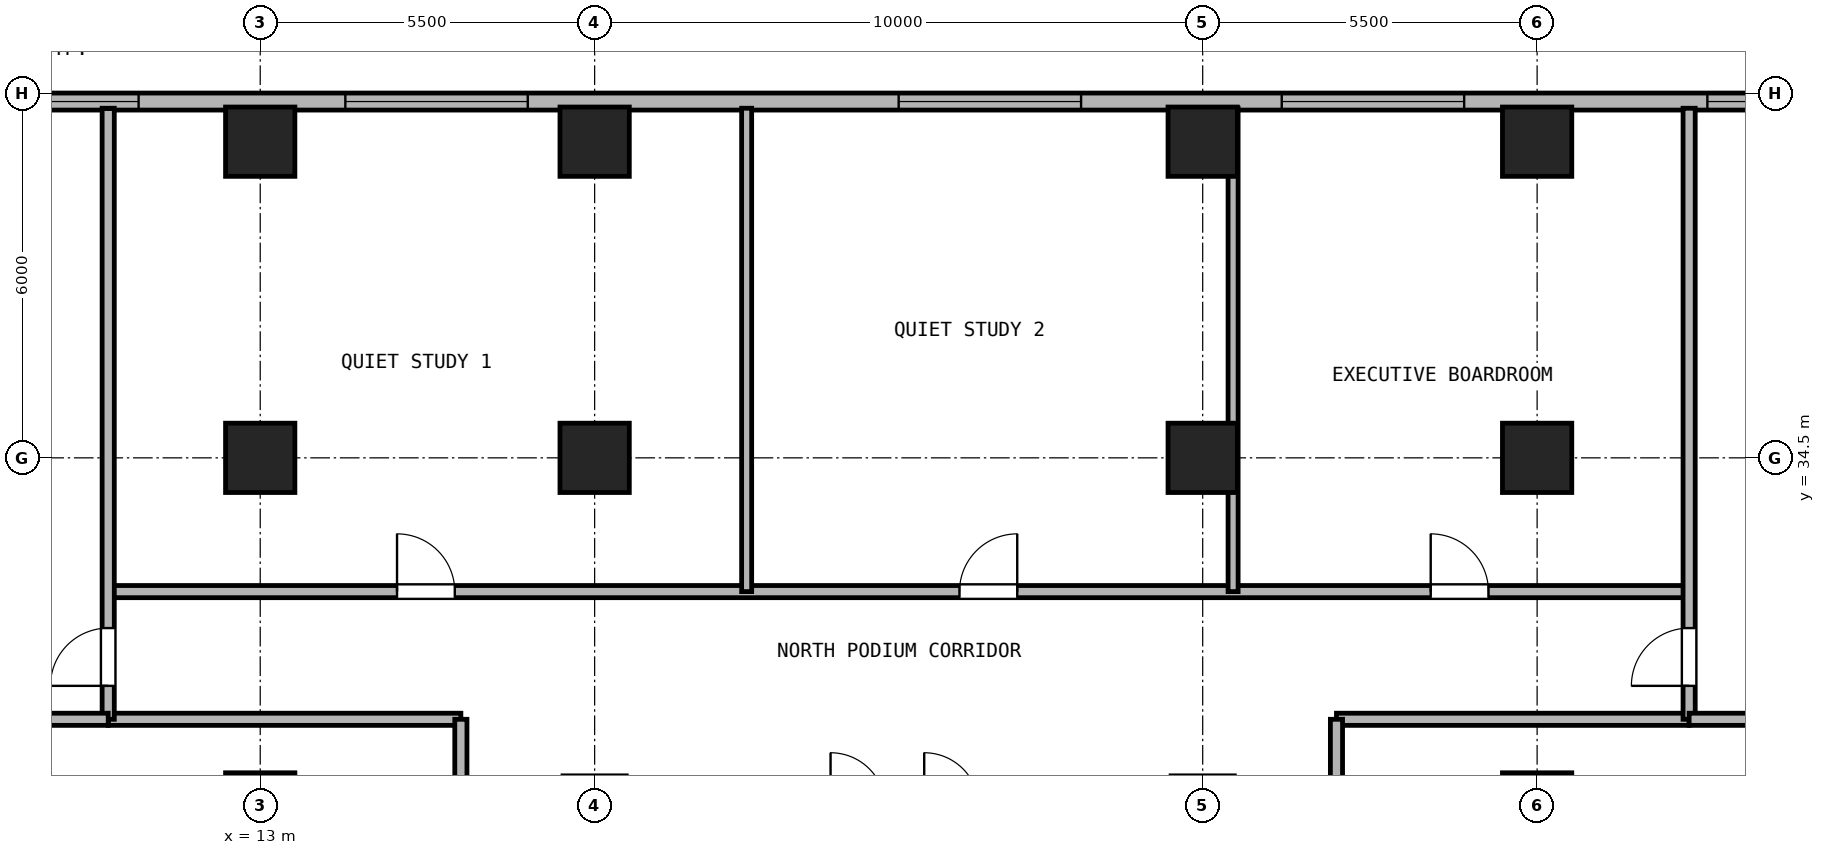
"""IFC4 building model, lengths in metres.
Left out: names, types, materials, properties, quantities, classifications, styles, units other than length and angle.
Written with IfcOpenShell. Run it as: python <this file> out.ifc"""

import sys

from ifc_helpers import new_model, si_unit, direction, frame, frame_2d, origin, origin_2d, place, context, subcontext, project, spatial, rectangle, hollow_rectangle, extrude, source, transform, mapped, element, fill, save


model = new_model("IFC4")
c1 = context("Model", 3, precision=1e-05, world=origin(), true_north=direction((0.0, 1.0)))
c2 = subcontext(c1, "Body", "Model", "MODEL_VIEW")
j1 = project(units=[si_unit("LENGTHUNIT", "METRE"), si_unit("PLANEANGLEUNIT", "RADIAN")], contexts=[c1])
p1 = place(None, origin())
s1 = spatial("IfcSite", under=j1, at=p1, CompositionType="ELEMENT")
p2 = place(p1, origin())
s2 = spatial("IfcBuilding", under=s1, at=p2, CompositionType="ELEMENT")
p3 = place(p2, frame((0.0, 0.0, 13.5)))
s3 = spatial("IfcBuildingStorey", under=s2, at=p3, CompositionType="ELEMENT", Elevation=13.5)
m1 = source(origin(), c2, "Body", "SweptSolid", [
    extrude(hollow_rectangle(XDim=1.14, YDim=1.14, WallThickness=0.07, at=origin_2d()), origin(), (0.0, 0.0, 1.0), 4.18),
])
for number, where, z_axis, x_axis in (
    (1, (13.0, 39.7, 0.0), (0.0, 0.0, 1.0), (1.0, 0.0, 0.0)),
    (2, (18.5, 39.7, 0.0), (0.0, 0.0, 1.0), (1.0, 0.0, 0.0)),
    (3, (28.5, 39.7, 0.0), (0.0, 0.0, 1.0), (1.0, 0.0, 0.0)),
    (4, (34.0, 39.7, 0.0), (0.0, 0.0, 1.0), (1.0, 0.0, 0.0)),
    (5, (13.0, 28.75, 0.0), (0.0, 0.0, 1.0), (1.0, 0.0, 0.0)),
    (6, (13.0, 34.5, 0.0), (0.0, 0.0, 1.0), (1.0, 0.0, 0.0)),
    (7, (18.5, 34.5, 0.0), (0.0, 0.0, 1.0), (1.0, 0.0, 0.0)),
    (8, (28.5, 34.5, 0.0), (0.0, 0.0, 1.0), (1.0, 0.0, 0.0)),
    (9, (34.0, 28.75, 0.0), (0.0, 0.0, 1.0), (1.0, 0.0, 0.0)),
    (10, (34.0, 34.5, 0.0), (0.0, 0.0, 1.0), (1.0, 0.0, 0.0)),
):
    element("IfcColumn", number, at=place(p3, frame(where, z_axis=z_axis, x_axis=x_axis)), inside=s3, PredefinedType="COLUMN", context=c2, shape_type="MappedRepresentation", body=[
        mapped(m1, transform((0.0, 0.0, 0.0), x_axis=(1.0, 0.0, 0.0), y_axis=(0.0, 1.0, 0.0), z_axis=(0.0, 0.0, 1.0), scale=1.0)),
    ])
p4 = place(p3, frame((4.0, 40.36, 0.0), z_axis=(0.0, 0.0, 1.0), x_axis=(1.0, 0.0, 0.0)))
e11 = element("IfcWall", 11, at=p4, inside=s3, PredefinedType="SOLIDWALL", context=c2, shape_type="SweptSolid", body=[
    extrude(rectangle(XDim=39.0, YDim=0.28, at=frame_2d((19.5, 0.0))), origin(), (0.0, 0.0, 1.0), 4.18),
])
p5 = place(p4, frame((4.0, 0.0, 0.9)))
e12 = element("IfcOpeningElement", 12, at=p5, cuts=e11, PredefinedType="OPENING", context=c2, shape_type="SweptSolid", body=[
    extrude(rectangle(XDim=3.0, YDim=2.25, at=frame_2d((1.5, 1.125))), frame((0.0, 0.15, 0.0), z_axis=(0.0, -1.0, 0.0), x_axis=(1.0, 0.0, 0.0)), (0.0, 0.0, 1.0), 0.3),
])
p6 = place(p4, frame((10.4, 0.0, 0.9)))
e13 = element("IfcOpeningElement", 13, at=p6, cuts=e11, PredefinedType="OPENING", context=c2, shape_type="SweptSolid", body=[
    extrude(rectangle(XDim=3.0, YDim=2.25, at=frame_2d((1.5, 1.125))), frame((0.0, 0.15, 0.0), z_axis=(0.0, -1.0, 0.0), x_axis=(1.0, 0.0, 0.0)), (0.0, 0.0, 1.0), 0.3),
])
p7 = place(p4, frame((19.5, 0.0, 0.9)))
e14 = element("IfcOpeningElement", 14, at=p7, cuts=e11, PredefinedType="OPENING", context=c2, shape_type="SweptSolid", body=[
    extrude(rectangle(XDim=3.0, YDim=2.25, at=frame_2d((1.5, 1.125))), frame((0.0, 0.15, 0.0), z_axis=(0.0, -1.0, 0.0), x_axis=(1.0, 0.0, 0.0)), (0.0, 0.0, 1.0), 0.3),
])
p8 = place(p4, frame((25.8, 0.0, 0.9)))
e15 = element("IfcOpeningElement", 15, at=p8, cuts=e11, PredefinedType="OPENING", context=c2, shape_type="SweptSolid", body=[
    extrude(rectangle(XDim=3.0, YDim=2.25, at=frame_2d((1.5, 1.125))), frame((0.0, 0.15, 0.0), z_axis=(0.0, -1.0, 0.0), x_axis=(1.0, 0.0, 0.0)), (0.0, 0.0, 1.0), 0.3),
])
p9 = place(p4, frame((32.8, 0.0, 0.9)))
e16 = element("IfcOpeningElement", 16, at=p9, cuts=e11, PredefinedType="OPENING", context=c2, shape_type="SweptSolid", body=[
    extrude(rectangle(XDim=3.0, YDim=2.25, at=frame_2d((1.5, 1.125))), frame((0.0, 0.15, 0.0), z_axis=(0.0, -1.0, 0.0), x_axis=(1.0, 0.0, 0.0)), (0.0, 0.0, 1.0), 0.3),
])
p10 = place(p3, frame((10.5, 32.3, 0.0), z_axis=(0.0, 0.0, 1.0), x_axis=(1.0, 0.0, 0.0)))
e17 = element("IfcWall", 17, at=p10, inside=s3, PredefinedType="PARTITIONING", context=c2, shape_type="SweptSolid", body=[
    extrude(rectangle(XDim=26.0, YDim=0.2, at=frame_2d((13.0, 0.0))), origin(), (0.0, 0.0, 1.0), 4.18),
])
p11 = place(p10, frame((4.75, 0.0, 0.0)))
e18 = element("IfcOpeningElement", 18, at=p11, cuts=e17, PredefinedType="OPENING", context=c2, shape_type="SweptSolid", body=[
    extrude(rectangle(XDim=0.95, YDim=2.15, at=frame_2d((0.475, 1.075))), frame((0.0, 0.11, 0.0), z_axis=(0.0, -1.0, 0.0), x_axis=(1.0, 0.0, 0.0)), (0.0, 0.0, 1.0), 0.22),
])
p12 = place(p10, frame((14.0, 0.0, 0.0)))
e19 = element("IfcOpeningElement", 19, at=p12, cuts=e17, PredefinedType="OPENING", context=c2, shape_type="SweptSolid", body=[
    extrude(rectangle(XDim=0.95, YDim=2.15, at=frame_2d((0.475, 1.075))), frame((0.0, 0.11, 0.0), z_axis=(0.0, -1.0, 0.0), x_axis=(1.0, 0.0, 0.0)), (0.0, 0.0, 1.0), 0.22),
])
p13 = place(p10, frame((21.75, 0.0, 0.0)))
e20 = element("IfcOpeningElement", 20, at=p13, cuts=e17, PredefinedType="OPENING", context=c2, shape_type="SweptSolid", body=[
    extrude(rectangle(XDim=0.95, YDim=2.15, at=frame_2d((0.475, 1.075))), frame((0.0, 0.11, 0.0), z_axis=(0.0, -1.0, 0.0), x_axis=(1.0, 0.0, 0.0)), (0.0, 0.0, 1.0), 0.22),
])
for number, where, z_axis, x_axis in (
    (21, (10.5, 30.2, 0.0), (0.0, 0.0, 1.0), (1.0, 0.0, 0.0)),
    (22, (30.7, 30.2, 0.0), (0.0, 0.0, 1.0), (1.0, 0.0, 0.0)),
):
    element("IfcWall", number, at=place(p3, frame(where, z_axis=z_axis, x_axis=x_axis)), inside=s3, PredefinedType="PARTITIONING", context=c2, shape_type="SweptSolid", body=[
        extrude(rectangle(XDim=5.8, YDim=0.2, at=frame_2d((2.9, 0.0))), origin(), (0.0, 0.0, 1.0), 4.18),
    ])
p14 = place(p3, frame((16.3, 9.5, 0.0), z_axis=(0.0, 0.0, 1.0), x_axis=(0.0, 1.0, 0.0)))
e23 = element("IfcWall", 23, at=p14, inside=s3, PredefinedType="PARTITIONING", context=c2, shape_type="SweptSolid", body=[
    extrude(rectangle(XDim=20.7, YDim=0.2, at=frame_2d((10.35, 0.0))), origin(), (0.0, 0.0, 1.0), 4.18),
])
p15 = place(p14, frame((5.0, 0.0, 0.0)))
e24 = element("IfcOpeningElement", 24, at=p15, cuts=e23, PredefinedType="OPENING", context=c2, shape_type="SweptSolid", body=[
    extrude(rectangle(XDim=0.95, YDim=2.15, at=frame_2d((0.475, 1.075))), frame((0.0, 0.11, 0.0), z_axis=(0.0, -1.0, 0.0), x_axis=(1.0, 0.0, 0.0)), (0.0, 0.0, 1.0), 0.22),
])
p16 = place(p14, frame((15.35, 0.0, 0.0)))
e25 = element("IfcOpeningElement", 25, at=p16, cuts=e23, PredefinedType="OPENING", context=c2, shape_type="SweptSolid", body=[
    extrude(rectangle(XDim=0.95, YDim=2.15, at=frame_2d((0.475, 1.075))), frame((0.0, 0.11, 0.0), z_axis=(0.0, -1.0, 0.0), x_axis=(1.0, 0.0, 0.0)), (0.0, 0.0, 1.0), 0.22),
])
p17 = place(p3, frame((30.7, 9.5, 0.0), z_axis=(0.0, 0.0, 1.0), x_axis=(0.0, 1.0, 0.0)))
e26 = element("IfcWall", 26, at=p17, inside=s3, PredefinedType="PARTITIONING", context=c2, shape_type="SweptSolid", body=[
    extrude(rectangle(XDim=20.7, YDim=0.2, at=frame_2d((10.35, 0.0))), origin(), (0.0, 0.0, 1.0), 4.18),
])
p18 = place(p17, frame((9.85, 0.0, 0.0)))
e27 = element("IfcOpeningElement", 27, at=p18, cuts=e26, PredefinedType="OPENING", context=c2, shape_type="SweptSolid", body=[
    extrude(rectangle(XDim=0.95, YDim=2.15, at=frame_2d((0.475, 1.075))), frame((0.0, 0.11, 0.0), z_axis=(0.0, -1.0, 0.0), x_axis=(1.0, 0.0, 0.0)), (0.0, 0.0, 1.0), 0.22),
])
p19 = place(p3, frame((10.5, 30.2, 0.0), z_axis=(0.0, 0.0, 1.0), x_axis=(0.0, 1.0, 0.0)))
e28 = element("IfcWall", 28, at=p19, inside=s3, PredefinedType="PARTITIONING", context=c2, shape_type="SweptSolid", body=[
    extrude(rectangle(XDim=10.05, YDim=0.2, at=frame_2d((5.025, 0.0))), origin(), (0.0, 0.0, 1.0), 4.18),
])
p20 = place(p19, frame((0.55, 0.0, 0.0)))
e29 = element("IfcOpeningElement", 29, at=p20, cuts=e28, PredefinedType="OPENING", context=c2, shape_type="SweptSolid", body=[
    extrude(rectangle(XDim=0.95, YDim=2.15, at=frame_2d((0.475, 1.075))), frame((0.0, 0.11, 0.0), z_axis=(0.0, -1.0, 0.0), x_axis=(1.0, 0.0, 0.0)), (0.0, 0.0, 1.0), 0.22),
])
p21 = place(p3, frame((36.5, 30.2, 0.0), z_axis=(0.0, 0.0, 1.0), x_axis=(0.0, 1.0, 0.0)))
e30 = element("IfcWall", 30, at=p21, inside=s3, PredefinedType="PARTITIONING", context=c2, shape_type="SweptSolid", body=[
    extrude(rectangle(XDim=10.05, YDim=0.2, at=frame_2d((5.025, 0.0))), origin(), (0.0, 0.0, 1.0), 4.18),
])
p22 = place(p21, frame((0.55, 0.0, 0.0)))
e31 = element("IfcOpeningElement", 31, at=p22, cuts=e30, PredefinedType="OPENING", context=c2, shape_type="SweptSolid", body=[
    extrude(rectangle(XDim=0.95, YDim=2.15, at=frame_2d((0.475, 1.075))), frame((0.0, 0.11, 0.0), z_axis=(0.0, -1.0, 0.0), x_axis=(1.0, 0.0, 0.0)), (0.0, 0.0, 1.0), 0.22),
])
for number, where, z_axis, x_axis in (
    (32, (0.25, 30.2, 0.0), (0.0, 0.0, 1.0), (1.0, 0.0, 0.0)),
    (33, (36.5, 30.2, 0.0), (0.0, 0.0, 1.0), (1.0, 0.0, 0.0)),
):
    element("IfcWall", number, at=place(p3, frame(where, z_axis=z_axis, x_axis=x_axis)), inside=s3, PredefinedType="PARTITIONING", context=c2, shape_type="SweptSolid", body=[
        extrude(rectangle(XDim=10.25, YDim=0.2, at=frame_2d((5.125, 0.0))), origin(), (0.0, 0.0, 1.0), 4.18),
    ])
for number, where, z_axis, x_axis in (
    (34, (21.0, 32.3, 0.0), (0.0, 0.0, 1.0), (0.0, 1.0, 0.0)),
    (35, (29.0, 32.3, 0.0), (0.0, 0.0, 1.0), (0.0, 1.0, 0.0)),
):
    element("IfcWall", number, at=place(p3, frame(where, z_axis=z_axis, x_axis=x_axis)), inside=s3, PredefinedType="PARTITIONING", context=c2, shape_type="SweptSolid", body=[
        extrude(rectangle(XDim=7.95, YDim=0.165, at=frame_2d((3.975, 0.0))), origin(), (0.0, 0.0, 1.0), 4.18),
    ])
p23 = place(p5, origin())
e36 = element("IfcWindow", 36, at=p23, inside=s3, PartitioningType="SINGLE_PANEL", PredefinedType="WINDOW", context=c2, shape_type="SweptSolid", body=[
    extrude(rectangle(XDim=3.0, YDim=2.25, at=frame_2d((1.5, 1.125))), frame((0.0, 0.03, 0.0), z_axis=(0.0, -1.0, 0.0), x_axis=(1.0, 0.0, 0.0)), (0.0, 0.0, 1.0), 0.06),
])
fill(e12, e36)
p24 = place(p6, origin())
e37 = element("IfcWindow", 37, at=p24, inside=s3, PartitioningType="SINGLE_PANEL", PredefinedType="WINDOW", context=c2, shape_type="SweptSolid", body=[
    extrude(rectangle(XDim=3.0, YDim=2.25, at=frame_2d((1.5, 1.125))), frame((0.0, 0.03, 0.0), z_axis=(0.0, -1.0, 0.0), x_axis=(1.0, 0.0, 0.0)), (0.0, 0.0, 1.0), 0.06),
])
fill(e13, e37)
p25 = place(p7, origin())
e38 = element("IfcWindow", 38, at=p25, inside=s3, PartitioningType="SINGLE_PANEL", PredefinedType="WINDOW", context=c2, shape_type="SweptSolid", body=[
    extrude(rectangle(XDim=3.0, YDim=2.25, at=frame_2d((1.5, 1.125))), frame((0.0, 0.03, 0.0), z_axis=(0.0, -1.0, 0.0), x_axis=(1.0, 0.0, 0.0)), (0.0, 0.0, 1.0), 0.06),
])
fill(e14, e38)
p26 = place(p8, origin())
e39 = element("IfcWindow", 39, at=p26, inside=s3, PartitioningType="SINGLE_PANEL", PredefinedType="WINDOW", context=c2, shape_type="SweptSolid", body=[
    extrude(rectangle(XDim=3.0, YDim=2.25, at=frame_2d((1.5, 1.125))), frame((0.0, 0.03, 0.0), z_axis=(0.0, -1.0, 0.0), x_axis=(1.0, 0.0, 0.0)), (0.0, 0.0, 1.0), 0.06),
])
fill(e15, e39)
p27 = place(p9, origin())
e40 = element("IfcWindow", 40, at=p27, inside=s3, PartitioningType="SINGLE_PANEL", PredefinedType="WINDOW", context=c2, shape_type="SweptSolid", body=[
    extrude(rectangle(XDim=3.0, YDim=2.25, at=frame_2d((1.5, 1.125))), frame((0.0, 0.03, 0.0), z_axis=(0.0, -1.0, 0.0), x_axis=(1.0, 0.0, 0.0)), (0.0, 0.0, 1.0), 0.06),
])
fill(e16, e40)
p28 = place(p11, origin())
e41 = element("IfcDoor", 41, at=p28, inside=s3, OperationType="SINGLE_SWING_LEFT", PredefinedType="DOOR", context=c2, shape_type="SweptSolid", body=[
    extrude(rectangle(XDim=0.95, YDim=2.15, at=frame_2d((0.475, 1.075))), frame((0.0, 0.025, 0.0), z_axis=(0.0, -1.0, 0.0), x_axis=(1.0, 0.0, 0.0)), (0.0, 0.0, 1.0), 0.05),
])
fill(e18, e41)
p29 = place(p12, origin())
e42 = element("IfcDoor", 42, at=p29, inside=s3, OperationType="SINGLE_SWING_RIGHT", PredefinedType="DOOR", context=c2, shape_type="SweptSolid", body=[
    extrude(rectangle(XDim=0.95, YDim=2.15, at=frame_2d((0.475, 1.075))), frame((0.0, 0.025, 0.0), z_axis=(0.0, -1.0, 0.0), x_axis=(1.0, 0.0, 0.0)), (0.0, 0.0, 1.0), 0.05),
])
fill(e19, e42)
p30 = place(p13, origin())
e43 = element("IfcDoor", 43, at=p30, inside=s3, OperationType="SINGLE_SWING_LEFT", PredefinedType="DOOR", context=c2, shape_type="SweptSolid", body=[
    extrude(rectangle(XDim=0.95, YDim=2.15, at=frame_2d((0.475, 1.075))), frame((0.0, 0.025, 0.0), z_axis=(0.0, -1.0, 0.0), x_axis=(1.0, 0.0, 0.0)), (0.0, 0.0, 1.0), 0.05),
])
fill(e20, e43)
p31 = place(p20, frame((0.95, 0.0, 0.0), z_axis=(0.0, 0.0, 1.0), x_axis=(-1.0, 0.0, 0.0)))
e44 = element("IfcDoor", 44, at=p31, inside=s3, OperationType="SINGLE_SWING_LEFT", PredefinedType="DOOR", context=c2, shape_type="SweptSolid", body=[
    extrude(rectangle(XDim=0.95, YDim=2.15, at=frame_2d((0.475, 1.075))), frame((0.0, 0.025, 0.0), z_axis=(0.0, -1.0, 0.0), x_axis=(1.0, 0.0, 0.0)), (0.0, 0.0, 1.0), 0.05),
])
fill(e29, e44)
p32 = place(p22, origin())
e45 = element("IfcDoor", 45, at=p32, inside=s3, OperationType="SINGLE_SWING_LEFT", PredefinedType="DOOR", context=c2, shape_type="SweptSolid", body=[
    extrude(rectangle(XDim=0.95, YDim=2.15, at=frame_2d((0.475, 1.075))), frame((0.0, 0.025, 0.0), z_axis=(0.0, -1.0, 0.0), x_axis=(1.0, 0.0, 0.0)), (0.0, 0.0, 1.0), 0.05),
])
fill(e31, e45)
save(model, sys.argv[1])
